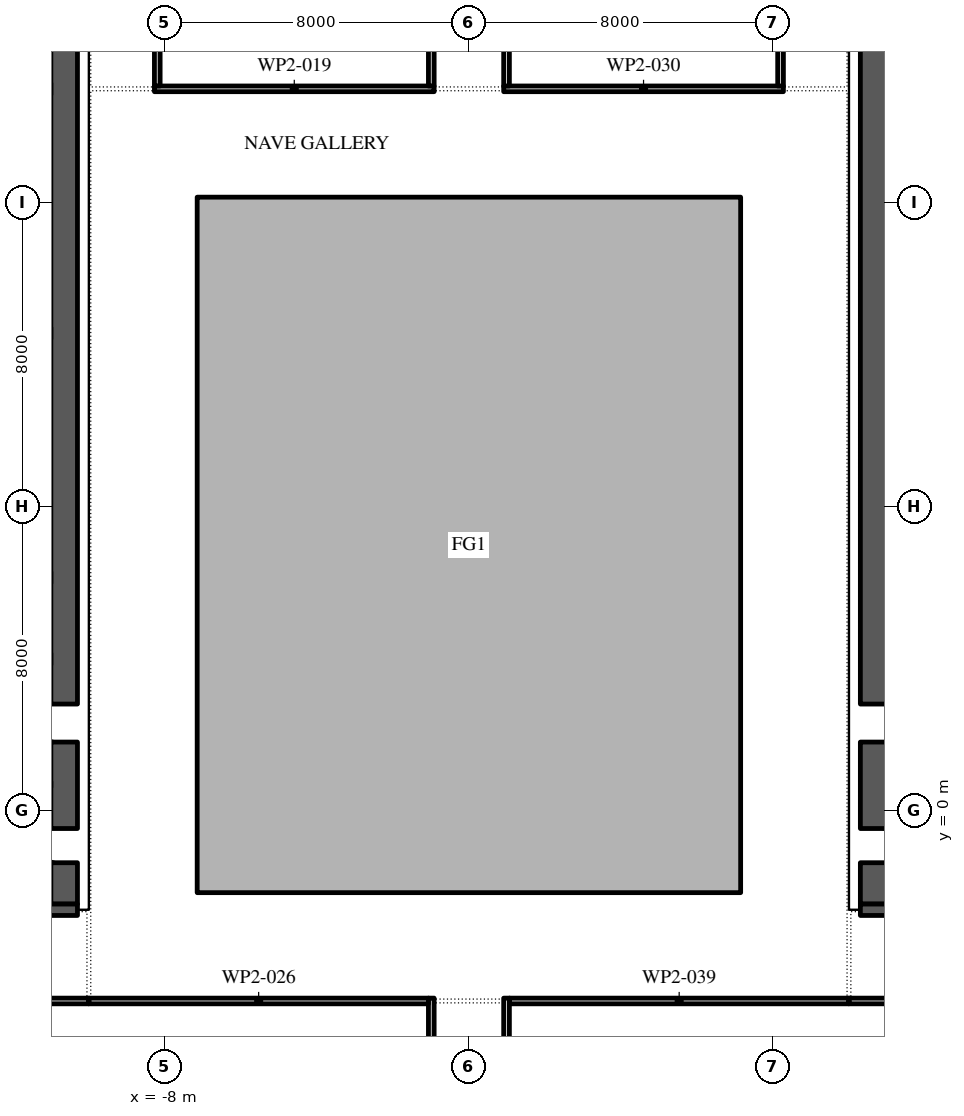
"""IFC4 building model, lengths in metres.
Left out: names, types, materials, properties, quantities, classifications, styles, units other than length and angle.
Written with IfcOpenShell. Run it as: python <this file> out.ifc"""

import sys

from ifc_helpers import new_model, si_unit, direction, frame, frame_2d, origin, place, context, subcontext, project, spatial, polyline, rectangle, outline, extrude, element, save


model = new_model("IFC4")
c1 = context("Model", 3, precision=1e-05, world=origin(), true_north=direction((0.0, 1.0)))
c2 = subcontext(c1, "Body", "Model", "MODEL_VIEW")
j1 = project(units=[si_unit("LENGTHUNIT", "METRE"), si_unit("PLANEANGLEUNIT", "RADIAN")], contexts=[c1])
p1 = place(None, origin())
s1 = spatial("IfcSite", under=j1, at=p1, CompositionType="ELEMENT")
p2 = place(p1, origin())
s2 = spatial("IfcBuilding", under=s1, at=p2, CompositionType="ELEMENT")
p3 = place(p2, frame((0.0, 0.0, 205.2)))
s3 = spatial("IfcBuildingStorey", under=s2, at=p3, CompositionType="ELEMENT", Elevation=205.2)
p4 = place(p3, origin())
e1 = element("IfcWall", 1, at=p4, inside=s3, PredefinedType="STANDARD", context=c2, shape_type="SweptSolid", body=[
    extrude(outline(polyline([(-7.15, -2.15), (7.15, -2.15), (7.15, 16.15), (-7.15, 16.15), (-7.15, -2.15)]), holes=[polyline([(-7.0, -2.0), (-7.0, 16.0), (7.0, 16.0), (7.0, -2.0), (-7.0, -2.0)])]), origin(), (0.0, 0.0, 1.0), 4.0),
])
p5 = place(p3, frame((-10.65, -2.45, 0.0), z_axis=(0.0, 0.0, 1.0), x_axis=(0.0, 1.0, 0.0)))
e2 = element("IfcWall", 2, at=p5, inside=s3, PredefinedType="SHEAR", context=c2, shape_type="SweptSolid", body=[
    extrude(rectangle(XDim=27.9, YDim=0.7, at=frame_2d((13.95, 0.0))), origin(), (0.0, 0.0, 1.0), 4.0),
])
p6 = place(p5, frame((23.65, 0.0, 0.0)))
e3 = element("IfcOpeningElement", 3, at=p6, cuts=e2, PredefinedType="OPENING", context=c2, shape_type="SweptSolid", body=[
    extrude(rectangle(XDim=2.4, YDim=2.1, at=frame_2d((1.2, 1.05))), frame((0.0, 0.36, 0.0), z_axis=(0.0, -1.0, 0.0), x_axis=(1.0, 0.0, 0.0)), (0.0, 0.0, 1.0), 0.72),
])
p7 = place(p5, frame((1.087, 0.0, 0.0)))
e4 = element("IfcOpeningElement", 4, at=p7, cuts=e2, PredefinedType="OPENING", context=c2, shape_type="SweptSolid", body=[
    extrude(rectangle(XDim=0.9, YDim=2.1, at=frame_2d((0.45, 1.05))), frame((0.0, 0.36, 0.0), z_axis=(0.0, -1.0, 0.0), x_axis=(1.0, 0.0, 0.0)), (0.0, 0.0, 1.0), 0.72),
])
p8 = place(p5, frame((4.262, 0.0, 0.0)))
e5 = element("IfcOpeningElement", 5, at=p8, cuts=e2, PredefinedType="OPENING", context=c2, shape_type="SweptSolid", body=[
    extrude(rectangle(XDim=1.0, YDim=2.1, at=frame_2d((0.5, 1.05))), frame((0.0, 0.36, 0.0), z_axis=(0.0, -1.0, 0.0), x_axis=(1.0, 0.0, 0.0)), (0.0, 0.0, 1.0), 0.72),
])
p9 = place(p3, frame((-21.7, -2.6, 0.0), z_axis=(0.0, 0.0, 1.0), x_axis=(1.0, 0.0, 0.0)))
e6 = element("IfcWall", 6, at=p9, inside=s3, PredefinedType="SHEAR", context=c2, shape_type="SweptSolid", body=[
    extrude(rectangle(XDim=11.4, YDim=0.3, at=frame_2d((5.7, 0.0))), origin(), (0.0, 0.0, 1.0), 4.0),
])
p10 = place(p3, frame((10.65, -2.45, 0.0), z_axis=(0.0, 0.0, 1.0), x_axis=(0.0, 1.0, 0.0)))
e7 = element("IfcWall", 7, at=p10, inside=s3, PredefinedType="SHEAR", context=c2, shape_type="SweptSolid", body=[
    extrude(rectangle(XDim=27.9, YDim=0.7, at=frame_2d((13.95, 0.0))), origin(), (0.0, 0.0, 1.0), 4.0),
])
p11 = place(p10, frame((23.65, 0.0, 0.0)))
e8 = element("IfcOpeningElement", 8, at=p11, cuts=e7, PredefinedType="OPENING", context=c2, shape_type="SweptSolid", body=[
    extrude(rectangle(XDim=2.4, YDim=2.1, at=frame_2d((1.2, 1.05))), frame((0.0, 0.36, 0.0), z_axis=(0.0, -1.0, 0.0), x_axis=(1.0, 0.0, 0.0)), (0.0, 0.0, 1.0), 0.72),
])
p12 = place(p10, frame((1.087, 0.0, 0.0)))
e9 = element("IfcOpeningElement", 9, at=p12, cuts=e7, PredefinedType="OPENING", context=c2, shape_type="SweptSolid", body=[
    extrude(rectangle(XDim=0.9, YDim=2.1, at=frame_2d((0.45, 1.05))), frame((0.0, 0.36, 0.0), z_axis=(0.0, -1.0, 0.0), x_axis=(1.0, 0.0, 0.0)), (0.0, 0.0, 1.0), 0.72),
])
p13 = place(p10, frame((4.262, 0.0, 0.0)))
e10 = element("IfcOpeningElement", 10, at=p13, cuts=e7, PredefinedType="OPENING", context=c2, shape_type="SweptSolid", body=[
    extrude(rectangle(XDim=1.0, YDim=2.1, at=frame_2d((0.5, 1.05))), frame((0.0, 0.36, 0.0), z_axis=(0.0, -1.0, 0.0), x_axis=(1.0, 0.0, 0.0)), (0.0, 0.0, 1.0), 0.72),
])
p14 = place(p3, frame((10.3, -2.6, 0.0), z_axis=(0.0, 0.0, 1.0), x_axis=(1.0, 0.0, 0.0)))
e11 = element("IfcWall", 11, at=p14, inside=s3, PredefinedType="SHEAR", context=c2, shape_type="SweptSolid", body=[
    extrude(rectangle(XDim=11.4, YDim=0.3, at=frame_2d((5.7, 0.0))), origin(), (0.0, 0.0, 1.0), 4.0),
])
p15 = place(p3, frame((-10.0, -5.0, 0.0), z_axis=(0.0, 0.0, 1.0), x_axis=(-1.0, 0.0, 0.0)))
e12 = element("IfcWall", 12, at=p15, inside=s3, PredefinedType="PARTITIONING", context=c2, shape_type="SweptSolid", body=[
    extrude(rectangle(XDim=12.47, YDim=0.15, at=frame_2d((6.235, 0.0))), origin(), (0.0, 0.0, 1.0), 4.0),
])
p16 = place(p15, frame((8.37, 0.0, 0.0)))
e13 = element("IfcOpeningElement", 13, at=p16, cuts=e12, PredefinedType="OPENING", context=c2, shape_type="SweptSolid", body=[
    extrude(rectangle(XDim=1.0, YDim=2.1, at=frame_2d((0.5, 1.05))), frame((0.0, 0.085, 0.0), z_axis=(0.0, -1.0, 0.0), x_axis=(1.0, 0.0, 0.0)), (0.0, 0.0, 1.0), 0.17),
])
p17 = place(p3, frame((-8.275, 19.0, 0.0), z_axis=(0.0, 0.0, 1.0), x_axis=(1.0, 0.0, 0.0)))
e14 = element("IfcWall", 14, at=p17, inside=s3, PredefinedType="PARTITIONING", context=c2, shape_type="SweptSolid", body=[
    extrude(rectangle(XDim=7.36, YDim=0.15, at=frame_2d((3.68, 0.0))), origin(), (0.0, 0.0, 1.0), 4.0),
])
p18 = place(p3, frame((-8.2, 27.2, 0.0), z_axis=(0.0, 0.0, 1.0), x_axis=(0.0, -1.0, 0.0)))
e15 = element("IfcWall", 15, at=p18, inside=s3, PredefinedType="PARTITIONING", context=c2, shape_type="SweptSolid", body=[
    extrude(rectangle(XDim=8.125, YDim=0.15, at=frame_2d((4.062, 0.0))), origin(), (0.0, 0.0, 1.0), 4.0),
])
p19 = place(p3, frame((-0.99, -10.45, 0.0), z_axis=(0.0, 0.0, 1.0), x_axis=(0.0, 1.0, 0.0)))
e16 = element("IfcWall", 16, at=p19, inside=s3, PredefinedType="PARTITIONING", context=c2, shape_type="SweptSolid", body=[
    extrude(rectangle(XDim=5.525, YDim=0.15, at=frame_2d((2.762, 0.0))), origin(), (0.0, 0.0, 1.0), 4.0),
])
p20 = place(p3, frame((-1.065, -5.0, 0.0), z_axis=(0.0, 0.0, 1.0), x_axis=(-1.0, 0.0, 0.0)))
e17 = element("IfcWall", 17, at=p20, inside=s3, PredefinedType="PARTITIONING", context=c2, shape_type="SweptSolid", body=[
    extrude(rectangle(XDim=8.935, YDim=0.15, at=frame_2d((4.468, 0.0))), origin(), (0.0, 0.0, 1.0), 4.0),
])
p21 = place(p3, frame((-0.99, 19.075, 0.0), z_axis=(0.0, 0.0, 1.0), x_axis=(0.0, 1.0, 0.0)))
e18 = element("IfcWall", 18, at=p21, inside=s3, PredefinedType="PARTITIONING", context=c2, shape_type="SweptSolid", body=[
    extrude(rectangle(XDim=10.375, YDim=0.15, at=frame_2d((5.188, 0.0))), origin(), (0.0, 0.0, 1.0), 4.0),
])
p22 = place(p21, frame((6.775, 0.0, 0.0)))
e19 = element("IfcOpeningElement", 19, at=p22, cuts=e18, PredefinedType="OPENING", context=c2, shape_type="SweptSolid", body=[
    extrude(rectangle(XDim=1.0, YDim=2.1, at=frame_2d((0.5, 1.05))), frame((0.0, 0.085, 0.0), z_axis=(0.0, -1.0, 0.0), x_axis=(1.0, 0.0, 0.0)), (0.0, 0.0, 1.0), 0.17),
])
p23 = place(p3, frame((0.99, -4.925, 0.0), z_axis=(0.0, 0.0, 1.0), x_axis=(0.0, -1.0, 0.0)))
e20 = element("IfcWall", 20, at=p23, inside=s3, PredefinedType="PARTITIONING", context=c2, shape_type="SweptSolid", body=[
    extrude(rectangle(XDim=11.371, YDim=0.15, at=frame_2d((5.686, 0.0))), origin(), (0.0, 0.0, 1.0), 4.0),
])
p24 = place(p23, frame((2.945, 0.0, 0.0)))
e21 = element("IfcOpeningElement", 21, at=p24, cuts=e20, PredefinedType="OPENING", context=c2, shape_type="SweptSolid", body=[
    extrude(rectangle(XDim=1.0, YDim=2.1, at=frame_2d((0.5, 1.05))), frame((0.0, 0.085, 0.0), z_axis=(0.0, -1.0, 0.0), x_axis=(1.0, 0.0, 0.0)), (0.0, 0.0, 1.0), 0.17),
])
p25 = place(p3, frame((0.915, 19.0, 0.0), z_axis=(0.0, 0.0, 1.0), x_axis=(1.0, 0.0, 0.0)))
e22 = element("IfcWall", 22, at=p25, inside=s3, PredefinedType="PARTITIONING", context=c2, shape_type="SweptSolid", body=[
    extrude(rectangle(XDim=7.36, YDim=0.15, at=frame_2d((3.68, 0.0))), origin(), (0.0, 0.0, 1.0), 4.0),
])
p26 = place(p3, frame((0.99, 29.24, 0.0), z_axis=(0.0, 0.0, 1.0), x_axis=(0.0, -1.0, 0.0)))
e23 = element("IfcWall", 23, at=p26, inside=s3, PredefinedType="PARTITIONING", context=c2, shape_type="SweptSolid", body=[
    extrude(rectangle(XDim=10.165, YDim=0.15, at=frame_2d((5.083, 0.0))), origin(), (0.0, 0.0, 1.0), 4.0),
])
p27 = place(p26, frame((3.59, 0.0, 0.0)))
e24 = element("IfcOpeningElement", 24, at=p27, cuts=e23, PredefinedType="OPENING", context=c2, shape_type="SweptSolid", body=[
    extrude(rectangle(XDim=1.0, YDim=2.1, at=frame_2d((0.5, 1.05))), frame((0.0, 0.085, 0.0), z_axis=(0.0, -1.0, 0.0), x_axis=(1.0, 0.0, 0.0)), (0.0, 0.0, 1.0), 0.17),
])
p28 = place(p3, frame((8.2, 19.075, 0.0), z_axis=(0.0, 0.0, 1.0), x_axis=(0.0, 1.0, 0.0)))
e25 = element("IfcWall", 25, at=p28, inside=s3, PredefinedType="PARTITIONING", context=c2, shape_type="SweptSolid", body=[
    extrude(rectangle(XDim=8.125, YDim=0.15, at=frame_2d((4.062, 0.0))), origin(), (0.0, 0.0, 1.0), 4.0),
])
p29 = place(p3, frame((10.0, -5.0, 0.0), z_axis=(0.0, 0.0, 1.0), x_axis=(-1.0, 0.0, 0.0)))
e26 = element("IfcWall", 26, at=p29, inside=s3, PredefinedType="PARTITIONING", context=c2, shape_type="SweptSolid", body=[
    extrude(rectangle(XDim=8.935, YDim=0.15, at=frame_2d((4.468, 0.0))), origin(), (0.0, 0.0, 1.0), 4.0),
])
p30 = place(p3, frame((17.97, -5.0, 0.0), z_axis=(0.0, 0.0, 1.0), x_axis=(-1.0, 0.0, 0.0)))
e27 = element("IfcWall", 27, at=p30, inside=s3, PredefinedType="PARTITIONING", context=c2, shape_type="SweptSolid", body=[
    extrude(rectangle(XDim=7.97, YDim=0.15, at=frame_2d((3.985, 0.0))), origin(), (0.0, 0.0, 1.0), 4.0),
])
save(model, sys.argv[1])
